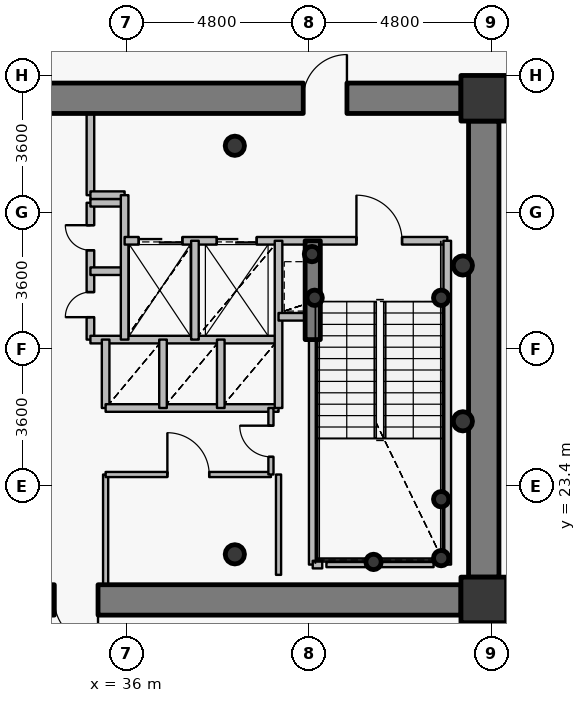
"""IFC4 building model, lengths in metres.
Left out: names, types, materials, properties, quantities, classifications, styles, units other than length and angle.
Written with IfcOpenShell. Run it as: python <this file> out.ifc"""

import sys

from ifc_helpers import new_model, si_unit, direction, frame, frame_2d, origin, origin_2d, place, context, subcontext, project, spatial, rectangle, hollow_circle, extrude, source, transform, mapped, element, fill, save


model = new_model("IFC4")
c1 = context("Model", 3, precision=1e-05, world=origin(), true_north=direction((0.0, 1.0)))
c2 = subcontext(c1, "Body", "Model", "MODEL_VIEW")
j1 = project(units=[si_unit("LENGTHUNIT", "METRE"), si_unit("PLANEANGLEUNIT", "RADIAN")], contexts=[c1])
p1 = place(None, origin())
s1 = spatial("IfcSite", under=j1, at=p1, CompositionType="ELEMENT")
p2 = place(p1, origin())
s2 = spatial("IfcBuilding", under=s1, at=p2, CompositionType="ELEMENT")
p3 = place(p2, frame((0.0, 0.0, 159.9)))
s3 = spatial("IfcBuildingStorey", under=s2, at=p3, CompositionType="ELEMENT", Elevation=159.9)
for number, where, z_axis, x_axis in (
    (1, (45.4, 20.4, 0.0), (0.0, 0.0, 1.0), (1.0, 0.0, 0.0)),
    (2, (45.4, 33.6, 0.0), (0.0, 0.0, 1.0), (1.0, 0.0, 0.0)),
):
    element("IfcColumn", number, at=place(p3, frame(where, z_axis=z_axis, x_axis=x_axis)), inside=s3, PredefinedType="COLUMN", context=c2, shape_type="SweptSolid", body=[
        extrude(rectangle(XDim=1.2, YDim=1.2, at=origin_2d()), origin(), (0.0, 0.0, 1.0), 3.75),
    ])
for number, where, z_axis, x_axis in (
    (3, (38.85, 21.6, 0.0), (0.0, 0.0, 1.0), (1.0, 0.0, 0.0)),
    (4, (38.85, 32.35, 0.0), (0.0, 0.0, 1.0), (1.0, 0.0, 0.0)),
):
    element("IfcColumn", number, at=place(p3, frame(where, z_axis=z_axis, x_axis=x_axis)), inside=s3, PredefinedType="COLUMN", context=c2, shape_type="SweptSolid", body=[
        extrude(hollow_circle(Radius=0.254, WallThickness=0.02, at=origin_2d()), origin(), (0.0, 0.0, 1.0), 3.75),
    ])
for number, where, z_axis, x_axis in (
    (5, (44.28, 21.5, 0.0), (0.0, 0.0, 1.0), (1.0, 0.0, 0.0)),
    (6, (44.28, 23.05, 0.0), (0.0, 0.0, 1.0), (1.0, 0.0, 0.0)),
    (7, (42.5, 21.4, 0.0), (0.0, 0.0, 1.0), (1.0, 0.0, 0.0)),
    (8, (40.95, 28.35, 0.0), (0.0, 0.0, 1.0), (1.0, 0.0, 0.0)),
    (9, (44.28, 28.35, 0.0), (0.0, 0.0, 1.0), (1.0, 0.0, 0.0)),
    (10, (40.88, 29.5, 0.0), (0.0, 0.0, 1.0), (1.0, 0.0, 0.0)),
):
    element("IfcColumn", number, at=place(p3, frame(where, z_axis=z_axis, x_axis=x_axis)), inside=s3, PredefinedType="COLUMN", context=c2, shape_type="SweptSolid", body=[
        extrude(hollow_circle(Radius=0.203, WallThickness=0.016, at=origin_2d()), origin(), (0.0, 0.0, 1.0), 3.75),
    ])
p4 = place(p3, frame((27.2, 33.6, 0.0), z_axis=(0.0, 0.0, 1.0), x_axis=(1.0, 0.0, 0.0)))
e11 = element("IfcWall", 11, at=p4, inside=s3, PredefinedType="SHEAR", context=c2, shape_type="SweptSolid", body=[
    extrude(rectangle(XDim=17.6, YDim=0.8, at=frame_2d((8.8, 0.0))), origin(), (0.0, 0.0, 1.0), 2.95),
])
p5 = place(p4, frame((13.45, 0.0, 0.0)))
e12 = element("IfcOpeningElement", 12, at=p5, cuts=e11, PredefinedType="OPENING", context=c2, shape_type="SweptSolid", body=[
    extrude(rectangle(XDim=1.15, YDim=2.15, at=origin_2d()), frame((0.575, 0.41, 1.075), z_axis=(0.0, -1.0, 0.0), x_axis=(1.0, 0.0, 0.0)), (0.0, 0.0, 1.0), 0.82),
])
p6 = place(p3, frame((45.4, 33.0, 0.0), z_axis=(0.0, 0.0, 1.0), x_axis=(0.0, -1.0, 0.0)))
e13 = element("IfcWall", 13, at=p6, inside=s3, PredefinedType="SHEAR", context=c2, shape_type="SweptSolid", body=[
    extrude(rectangle(XDim=12.0, YDim=0.8, at=frame_2d((6.0, 0.0))), origin(), (0.0, 0.0, 1.0), 2.95),
])
p7 = place(p3, frame((44.8, 20.4, 0.0), z_axis=(0.0, 0.0, 1.0), x_axis=(-1.0, 0.0, 0.0)))
e14 = element("IfcWall", 14, at=p7, inside=s3, PredefinedType="SHEAR", context=c2, shape_type="SweptSolid", body=[
    extrude(rectangle(XDim=17.6, YDim=0.8, at=frame_2d((8.8, 0.0))), origin(), (0.0, 0.0, 1.0), 2.95),
])
p8 = place(p7, frame((9.55, 0.0, 0.0)))
e15 = element("IfcOpeningElement", 15, at=p8, cuts=e14, PredefinedType="OPENING", context=c2, shape_type="SweptSolid", body=[
    extrude(rectangle(XDim=1.15, YDim=2.15, at=origin_2d()), frame((0.575, 0.41, 1.075), z_axis=(0.0, -1.0, 0.0), x_axis=(1.0, 0.0, 0.0)), (0.0, 0.0, 1.0), 0.82),
])
p9 = place(p3, frame((40.9, 27.25, 0.0), z_axis=(0.0, 0.0, 1.0), x_axis=(0.0, 1.0, 0.0)))
e16 = element("IfcWall", 16, at=p9, inside=s3, PredefinedType="SHEAR", context=c2, shape_type="SweptSolid", body=[
    extrude(rectangle(XDim=2.6, YDim=0.4, at=frame_2d((1.3, 0.0))), origin(), (0.0, 0.0, 1.0), 3.1),
])
for number, where, z_axis, x_axis in (
    (17, (44.85, 25.1, 0.0), (0.0, 0.0, 1.0), (1.0, 0.0, 0.0)),
    (18, (44.85, 29.2, 0.0), (0.0, 0.0, 1.0), (1.0, 0.0, 0.0)),
):
    element("IfcColumn", number, at=place(p3, frame(where, z_axis=z_axis, x_axis=x_axis)), inside=s3, PredefinedType="COLUMN", context=c2, shape_type="SweptSolid", body=[
        extrude(hollow_circle(Radius=0.254, WallThickness=0.02, at=origin_2d()), origin(), (0.0, 0.0, 1.0), 3.75),
    ])
p10 = place(p3, frame((35.05, 27.25, 0.0), z_axis=(0.0, 0.0, 1.0), x_axis=(0.0, 1.0, 0.0)))
e19 = element("IfcWall", 19, at=p10, inside=s3, PredefinedType="PARTITIONING", context=c2, shape_type="SweptSolid", body=[
    extrude(rectangle(XDim=3.6, YDim=0.2, at=frame_2d((1.8, 0.0))), origin(), (0.0, 0.0, 1.0), 3.5),
])
p11 = place(p10, frame((0.59, 0.0, 0.0)))
e20 = element("IfcOpeningElement", 20, at=p11, cuts=e19, PredefinedType="OPENING", context=c2, shape_type="SweptSolid", body=[
    extrude(rectangle(XDim=0.66, YDim=2.05, at=origin_2d()), frame((0.33, 0.11, 1.025), z_axis=(0.0, -1.0, 0.0), x_axis=(1.0, 0.0, 0.0)), (0.0, 0.0, 1.0), 0.22),
])
p12 = place(p10, frame((2.35, 0.0, 0.0)))
e21 = element("IfcOpeningElement", 21, at=p12, cuts=e19, PredefinedType="OPENING", context=c2, shape_type="SweptSolid", body=[
    extrude(rectangle(XDim=0.66, YDim=2.05, at=origin_2d()), frame((0.33, 0.11, 1.025), z_axis=(0.0, -1.0, 0.0), x_axis=(1.0, 0.0, 0.0)), (0.0, 0.0, 1.0), 0.22),
])
p13 = place(p3, frame((35.05, 27.25, 0.0), z_axis=(0.0, 0.0, 1.0), x_axis=(1.0, 0.0, 0.0)))
e22 = element("IfcWall", 22, at=p13, inside=s3, PredefinedType="PARTITIONING", context=c2, shape_type="SweptSolid", body=[
    extrude(rectangle(XDim=4.95, YDim=0.2, at=frame_2d((2.475, 0.0))), origin(), (0.0, 0.0, 1.0), 3.085),
])
for number, where, z_axis, x_axis in (
    (23, (35.05, 29.05, 0.0), (0.0, 0.0, 1.0), (1.0, 0.0, 0.0)),
    (24, (35.05, 30.85, 0.0), (0.0, 0.0, 1.0), (1.0, 0.0, 0.0)),
):
    element("IfcWall", number, at=place(p3, frame(where, z_axis=z_axis, x_axis=x_axis)), inside=s3, PredefinedType="PARTITIONING", context=c2, shape_type="SweptSolid", body=[
        extrude(rectangle(XDim=0.9, YDim=0.2, at=frame_2d((0.45, 0.0))), origin(), (0.0, 0.0, 1.0), 3.5),
    ])
p14 = place(p3, frame((35.05, 31.05, 0.0), z_axis=(0.0, 0.0, 1.0), x_axis=(0.0, 1.0, 0.0)))
e25 = element("IfcWall", 25, at=p14, inside=s3, PredefinedType="PARTITIONING", context=c2, shape_type="SweptSolid", body=[
    extrude(rectangle(XDim=2.15, YDim=0.2, at=frame_2d((1.075, 0.0))), origin(), (0.0, 0.0, 1.0), 3.085),
])
p15 = place(p3, frame((35.05, 31.05, 0.0), z_axis=(0.0, 0.0, 1.0), x_axis=(1.0, 0.0, 0.0)))
e26 = element("IfcWall", 26, at=p15, inside=s3, PredefinedType="PARTITIONING", context=c2, shape_type="SweptSolid", body=[
    extrude(rectangle(XDim=0.9, YDim=0.2, at=frame_2d((0.45, 0.0))), origin(), (0.0, 0.0, 1.0), 3.5),
])
p16 = place(p3, frame((35.45, 20.8, 0.0), z_axis=(0.0, 0.0, 1.0), x_axis=(0.0, 1.0, 0.0)))
e27 = element("IfcWall", 27, at=p16, inside=s3, PredefinedType="PARTITIONING", context=c2, shape_type="SweptSolid", body=[
    extrude(rectangle(XDim=2.9, YDim=0.135, at=frame_2d((1.45, 0.0))), origin(), (0.0, 0.0, 1.0), 3.085),
])
p17 = place(p3, frame((35.45, 23.7, 0.0), z_axis=(0.0, 0.0, 1.0), x_axis=(1.0, 0.0, 0.0)))
e28 = element("IfcWall", 28, at=p17, inside=s3, PredefinedType="PARTITIONING", context=c2, shape_type="SweptSolid", body=[
    extrude(rectangle(XDim=4.35, YDim=0.135, at=frame_2d((2.175, 0.0))), origin(), (0.0, 0.0, 1.0), 3.085),
])
p18 = place(p17, frame((1.625, 0.0, 0.0)))
e29 = element("IfcOpeningElement", 29, at=p18, cuts=e28, PredefinedType="OPENING", context=c2, shape_type="SweptSolid", body=[
    extrude(rectangle(XDim=1.1, YDim=2.15, at=origin_2d()), frame((0.55, 0.078, 1.075), z_axis=(0.0, -1.0, 0.0), x_axis=(1.0, 0.0, 0.0)), (0.0, 0.0, 1.0), 0.155),
])
p19 = place(p3, frame((35.45, 25.45, 0.0), z_axis=(0.0, 0.0, 1.0), x_axis=(0.0, 1.0, 0.0)))
e30 = element("IfcWall", 30, at=p19, inside=s3, PredefinedType="PARTITIONING", context=c2, shape_type="SweptSolid", body=[
    extrude(rectangle(XDim=1.8, YDim=0.2, at=frame_2d((0.9, 0.0))), origin(), (0.0, 0.0, 1.0), 3.5),
])
p20 = place(p3, frame((35.45, 25.45, 0.0), z_axis=(0.0, 0.0, 1.0), x_axis=(1.0, 0.0, 0.0)))
e31 = element("IfcWall", 31, at=p20, inside=s3, PredefinedType="PARTITIONING", context=c2, shape_type="SweptSolid", body=[
    extrude(rectangle(XDim=4.55, YDim=0.2, at=frame_2d((2.275, 0.0))), origin(), (0.0, 0.0, 1.0), 3.085),
])
p21 = place(p3, frame((35.95, 27.25, 0.0), z_axis=(0.0, 0.0, 1.0), x_axis=(0.0, 1.0, 0.0)))
e32 = element("IfcWall", 32, at=p21, inside=s3, PredefinedType="PARTITIONING", context=c2, shape_type="SweptSolid", body=[
    extrude(rectangle(XDim=3.8, YDim=0.2, at=frame_2d((1.9, 0.0))), origin(), (0.0, 0.0, 1.0), 3.5),
])
p22 = place(p3, frame((35.95, 29.85, 0.0), z_axis=(0.0, 0.0, 1.0), x_axis=(1.0, 0.0, 0.0)))
e33 = element("IfcWall", 33, at=p22, inside=s3, PredefinedType="PARTITIONING", context=c2, shape_type="SweptSolid", body=[
    extrude(rectangle(XDim=8.49, YDim=0.2, at=frame_2d((4.245, 0.0))), origin(), (0.0, 0.0, 1.0), 3.085),
])
p23 = place(p22, frame((6.1, 0.0, 0.0)))
e34 = element("IfcOpeningElement", 34, at=p23, cuts=e33, PredefinedType="OPENING", context=c2, shape_type="SweptSolid", body=[
    extrude(rectangle(XDim=1.2, YDim=2.15, at=origin_2d()), frame((0.6, 0.11, 1.075), z_axis=(0.0, -1.0, 0.0), x_axis=(1.0, 0.0, 0.0)), (0.0, 0.0, 1.0), 0.22),
])
p24 = place(p22, frame((0.37, 0.0, 0.0)))
e35 = element("IfcOpeningElement", 35, at=p24, cuts=e33, PredefinedType="OPENING", context=c2, shape_type="SweptSolid", body=[
    extrude(rectangle(XDim=1.15, YDim=2.15, at=origin_2d()), frame((0.575, 0.11, 1.075), z_axis=(0.0, -1.0, 0.0), x_axis=(1.0, 0.0, 0.0)), (0.0, 0.0, 1.0), 0.22),
])
p25 = place(p22, frame((2.425, 0.0, 0.0)))
e36 = element("IfcOpeningElement", 36, at=p25, cuts=e33, PredefinedType="OPENING", context=c2, shape_type="SweptSolid", body=[
    extrude(rectangle(XDim=1.05, YDim=2.15, at=origin_2d()), frame((0.525, 0.11, 1.075), z_axis=(0.0, -1.0, 0.0), x_axis=(1.0, 0.0, 0.0)), (0.0, 0.0, 1.0), 0.22),
])
p26 = place(p3, frame((36.96, 25.45, 0.0), z_axis=(0.0, 0.0, 1.0), x_axis=(0.0, 1.0, 0.0)))
e37 = element("IfcWall", 37, at=p26, inside=s3, PredefinedType="PARTITIONING", context=c2, shape_type="SweptSolid", body=[
    extrude(rectangle(XDim=1.8, YDim=0.2, at=frame_2d((0.9, 0.0))), origin(), (0.0, 0.0, 1.0), 3.5),
])
p27 = place(p3, frame((37.8, 27.25, 0.0), z_axis=(0.0, 0.0, 1.0), x_axis=(0.0, 1.0, 0.0)))
e38 = element("IfcWall", 38, at=p27, inside=s3, PredefinedType="PARTITIONING", context=c2, shape_type="SweptSolid", body=[
    extrude(rectangle(XDim=2.6, YDim=0.2, at=frame_2d((1.3, 0.0))), origin(), (0.0, 0.0, 1.0), 3.5),
])
p28 = place(p3, frame((38.48, 25.45, 0.0), z_axis=(0.0, 0.0, 1.0), x_axis=(0.0, 1.0, 0.0)))
e39 = element("IfcWall", 39, at=p28, inside=s3, PredefinedType="PARTITIONING", context=c2, shape_type="SweptSolid", body=[
    extrude(rectangle(XDim=1.8, YDim=0.2, at=frame_2d((0.9, 0.0))), origin(), (0.0, 0.0, 1.0), 3.5),
])
p29 = place(p3, frame((39.8, 23.7, 0.0), z_axis=(0.0, 0.0, 1.0), x_axis=(0.0, 1.0, 0.0)))
e40 = element("IfcWall", 40, at=p29, inside=s3, PredefinedType="PARTITIONING", context=c2, shape_type="SweptSolid", body=[
    extrude(rectangle(XDim=1.75, YDim=0.135, at=frame_2d((0.875, 0.0))), origin(), (0.0, 0.0, 1.0), 3.5),
])
p30 = place(p29, frame((0.465, 0.0, 0.0)))
e41 = element("IfcOpeningElement", 41, at=p30, cuts=e40, PredefinedType="OPENING", context=c2, shape_type="SweptSolid", body=[
    extrude(rectangle(XDim=0.82, YDim=2.1, at=origin_2d()), frame((0.41, 0.078, 1.05), z_axis=(0.0, -1.0, 0.0), x_axis=(1.0, 0.0, 0.0)), (0.0, 0.0, 1.0), 0.155),
])
p31 = place(p3, frame((40.0, 25.45, 0.0), z_axis=(0.0, 0.0, 1.0), x_axis=(0.0, 1.0, 0.0)))
e42 = element("IfcWall", 42, at=p31, inside=s3, PredefinedType="PARTITIONING", context=c2, shape_type="SweptSolid", body=[
    extrude(rectangle(XDim=4.4, YDim=0.2, at=frame_2d((2.2, 0.0))), origin(), (0.0, 0.0, 1.0), 3.5),
])
p32 = place(p3, frame((40.0, 27.85, 0.0), z_axis=(0.0, 0.0, 1.0), x_axis=(1.0, 0.0, 0.0)))
e43 = element("IfcWall", 43, at=p32, inside=s3, PredefinedType="PARTITIONING", context=c2, shape_type="SweptSolid", body=[
    extrude(rectangle(XDim=0.9, YDim=0.2, at=frame_2d((0.45, 0.0))), origin(), (0.0, 0.0, 1.0), 3.5),
])
p33 = place(p3, frame((40.9, 21.33, 0.0), z_axis=(0.0, 0.0, 1.0), x_axis=(0.0, 1.0, 0.0)))
e44 = element("IfcWall", 44, at=p33, inside=s3, PredefinedType="PARTITIONING", context=c2, shape_type="SweptSolid", body=[
    extrude(rectangle(XDim=5.91, YDim=0.2, at=frame_2d((2.955, 0.0))), origin(), (0.0, 0.0, 1.0), 3.035),
])
p34 = place(p3, frame((40.9, 21.33, 0.0), z_axis=(0.0, 0.0, 1.0), x_axis=(1.0, 0.0, 0.0)))
e45 = element("IfcWall", 45, at=p34, inside=s3, PredefinedType="PARTITIONING", context=c2, shape_type="SweptSolid", body=[
    extrude(rectangle(XDim=0.25, YDim=0.2, at=frame_2d((0.125, 0.0))), origin(), (0.0, 0.0, 1.0), 3.035),
])
p35 = place(p3, frame((44.44, 21.33, 0.0), z_axis=(0.0, 0.0, 1.0), x_axis=(0.0, 1.0, 0.0)))
e46 = element("IfcWall", 46, at=p35, inside=s3, PredefinedType="PARTITIONING", context=c2, shape_type="SweptSolid", body=[
    extrude(rectangle(XDim=8.52, YDim=0.2, at=frame_2d((4.26, 0.0))), origin(), (0.0, 0.0, 1.0), 3.5),
])
p36 = place(p3, frame((44.08, 21.33, 0.0), z_axis=(0.0, 0.0, 1.0), x_axis=(-1.0, 0.0, 0.0)))
e47 = element("IfcWall", 47, at=p36, inside=s3, PredefinedType="PARTITIONING", context=c2, shape_type="SweptSolid", body=[
    extrude(rectangle(XDim=2.82, YDim=0.135, at=frame_2d((1.41, 0.0))), origin(), (0.0, 0.0, 1.0), 3.035),
])
p37 = place(p3, frame((40.0, 23.7, 0.0), z_axis=(0.0, 0.0, 1.0), x_axis=(0.0, -1.0, 0.0)))
e48 = element("IfcWall", 48, at=p37, inside=s3, PredefinedType="PARTITIONING", context=c2, shape_type="SweptSolid", body=[
    extrude(rectangle(XDim=2.64, YDim=0.135, at=frame_2d((1.32, 0.0))), origin(), (0.0, 0.0, 1.0), 3.035),
])
for number, where, z_axis, x_axis in (
    (49, (45.8, 34.0, 0.0), (0.0, 0.0, 1.0), (-1.0, 0.0, 0.0)),
    (50, (44.81, 20.0, 0.0), (0.0, 0.0, 1.0), (1.0, 0.0, 0.0)),
):
    element("IfcWall", number, at=place(p3, frame(where, z_axis=z_axis, x_axis=x_axis)), inside=s3, PredefinedType="PARTITIONING", context=c2, shape_type="SweptSolid", body=[
        extrude(rectangle(XDim=0.99, YDim=0.135, at=frame_2d((0.495, 0.0))), origin(), (0.0, 0.0, 1.0), 2.935),
    ])
p38 = place(p3, frame((45.81, 20.05, 0.0), z_axis=(0.0, 0.0, 1.0), x_axis=(1.0, 0.0, 0.0)))
e51 = element("IfcWall", 51, at=p38, inside=s3, PredefinedType="PARTITIONING", context=c2, shape_type="SweptSolid", body=[
    extrude(rectangle(XDim=0.465, YDim=0.135, at=frame_2d((0.232, 0.0))), origin(), (0.0, 0.0, 1.0), 3.5),
])
p39 = place(p3, frame((45.8, 33.01, 0.0), z_axis=(0.0, 0.0, 1.0), x_axis=(0.0, 1.0, 0.0)))
e52 = element("IfcWall", 52, at=p39, inside=s3, PredefinedType="PARTITIONING", context=c2, shape_type="SweptSolid", body=[
    extrude(rectangle(XDim=0.682, YDim=0.15, at=frame_2d((0.341, 0.0))), origin(), (0.0, 0.0, 1.0), 3.5),
])
p40 = place(p3, frame((45.8, 33.767, 0.0), z_axis=(0.0, 0.0, 1.0), x_axis=(0.823065918238, 0.56794585502, 0.0)))
e53 = element("IfcWall", 53, at=p40, inside=s3, PredefinedType="PARTITIONING", context=c2, shape_type="SweptSolid", body=[
    extrude(rectangle(XDim=0.322, YDim=0.15, at=frame_2d((0.161, 0.0))), origin(), (0.0, 0.0, 1.0), 3.5),
])
p41 = place(p3, frame((45.8, 20.378, 0.0), z_axis=(0.0, 0.0, 1.0), x_axis=(0.0, 1.0, 0.0)))
e54 = element("IfcWall", 54, at=p41, inside=s3, PredefinedType="PARTITIONING", context=c2, shape_type="SweptSolid", body=[
    extrude(rectangle(XDim=0.612, YDim=0.135, at=frame_2d((0.306, 0.0))), origin(), (0.0, 0.0, 1.0), 3.5),
])
m1 = source(origin(), c2, "Body", "SweptSolid", [
    extrude(rectangle(XDim=1.15, YDim=2.15, at=origin_2d()), frame((0.575, 0.025, 1.075), z_axis=(0.0, -1.0, 0.0), x_axis=(1.0, 0.0, 0.0)), (0.0, 0.0, 1.0), 0.05),
])
p42 = place(p5, origin())
e55 = element("IfcDoor", 55, at=p42, inside=s3, OperationType="SINGLE_SWING_RIGHT", PredefinedType="DOOR", context=c2, shape_type="MappedRepresentation", body=[
    mapped(m1, transform((0.0, 0.0, 0.0), x_axis=(1.0, 0.0, 0.0), y_axis=(0.0, 1.0, 0.0), z_axis=(0.0, 0.0, 1.0), scale=1.0)),
])
fill(e12, e55)
p43 = place(p8, origin())
e56 = element("IfcDoor", 56, at=p43, inside=s3, OperationType="SINGLE_SWING_LEFT", PredefinedType="DOOR", context=c2, shape_type="MappedRepresentation", body=[
    mapped(m1, transform((0.0, 0.0, 0.0), x_axis=(1.0, 0.0, 0.0), y_axis=(0.0, 1.0, 0.0), z_axis=(0.0, 0.0, 1.0), scale=1.0)),
])
fill(e15, e56)
m2 = source(origin(), c2, "Body", "SweptSolid", [
    extrude(rectangle(XDim=1.2, YDim=2.15, at=origin_2d()), frame((0.6, 0.025, 1.075), z_axis=(0.0, -1.0, 0.0), x_axis=(1.0, 0.0, 0.0)), (0.0, 0.0, 1.0), 0.05),
])
p44 = place(p23, origin())
e57 = element("IfcDoor", 57, at=p44, inside=s3, OperationType="SINGLE_SWING_LEFT", PredefinedType="DOOR", context=c2, shape_type="MappedRepresentation", body=[
    mapped(m2, transform((0.0, 0.0, 0.0), x_axis=(1.0, 0.0, 0.0), y_axis=(0.0, 1.0, 0.0), z_axis=(0.0, 0.0, 1.0), scale=1.0)),
])
fill(e34, e57)
m3 = source(origin(), c2, "Body", "SweptSolid", [
    extrude(rectangle(XDim=1.15, YDim=2.15, at=origin_2d()), frame((0.575, 0.025, 1.075), z_axis=(0.0, -1.0, 0.0), x_axis=(1.0, 0.0, 0.0)), (0.0, 0.0, 1.0), 0.05),
])
p45 = place(p24, origin())
e58 = element("IfcDoor", 58, at=p45, inside=s3, OperationType="DOUBLE_DOOR_SLIDING", PredefinedType="USERDEFINED", context=c2, shape_type="MappedRepresentation", body=[
    mapped(m3, transform((0.0, 0.0, 0.0), x_axis=(1.0, 0.0, 0.0), y_axis=(0.0, 1.0, 0.0), z_axis=(0.0, 0.0, 1.0), scale=1.0)),
])
fill(e35, e58)
m4 = source(origin(), c2, "Body", "SweptSolid", [
    extrude(rectangle(XDim=1.05, YDim=2.15, at=origin_2d()), frame((0.525, 0.025, 1.075), z_axis=(0.0, -1.0, 0.0), x_axis=(1.0, 0.0, 0.0)), (0.0, 0.0, 1.0), 0.05),
])
p46 = place(p25, origin())
e59 = element("IfcDoor", 59, at=p46, inside=s3, OperationType="DOUBLE_DOOR_SLIDING", PredefinedType="USERDEFINED", context=c2, shape_type="MappedRepresentation", body=[
    mapped(m4, transform((0.0, 0.0, 0.0), x_axis=(1.0, 0.0, 0.0), y_axis=(0.0, 1.0, 0.0), z_axis=(0.0, 0.0, 1.0), scale=1.0)),
])
fill(e36, e59)
m5 = source(origin(), c2, "Body", "SweptSolid", [
    extrude(rectangle(XDim=0.66, YDim=2.05, at=origin_2d()), frame((0.33, 0.025, 1.025), z_axis=(0.0, -1.0, 0.0), x_axis=(1.0, 0.0, 0.0)), (0.0, 0.0, 1.0), 0.05),
])
p47 = place(p11, origin())
e60 = element("IfcDoor", 60, at=p47, inside=s3, OperationType="SINGLE_SWING_LEFT", PredefinedType="USERDEFINED", context=c2, shape_type="MappedRepresentation", body=[
    mapped(m5, transform((0.0, 0.0, 0.0), x_axis=(1.0, 0.0, 0.0), y_axis=(0.0, 1.0, 0.0), z_axis=(0.0, 0.0, 1.0), scale=1.0)),
])
fill(e20, e60)
p48 = place(p12, origin())
e61 = element("IfcDoor", 61, at=p48, inside=s3, OperationType="SINGLE_SWING_RIGHT", PredefinedType="USERDEFINED", context=c2, shape_type="MappedRepresentation", body=[
    mapped(m5, transform((0.0, 0.0, 0.0), x_axis=(1.0, 0.0, 0.0), y_axis=(0.0, 1.0, 0.0), z_axis=(0.0, 0.0, 1.0), scale=1.0)),
])
fill(e21, e61)
m6 = source(origin(), c2, "Body", "SweptSolid", [
    extrude(rectangle(XDim=1.1, YDim=2.15, at=origin_2d()), frame((0.55, 0.025, 1.075), z_axis=(0.0, -1.0, 0.0), x_axis=(1.0, 0.0, 0.0)), (0.0, 0.0, 1.0), 0.05),
])
p49 = place(p18, origin())
e62 = element("IfcDoor", 62, at=p49, inside=s3, OperationType="SINGLE_SWING_LEFT", PredefinedType="DOOR", context=c2, shape_type="MappedRepresentation", body=[
    mapped(m6, transform((0.0, 0.0, 0.0), x_axis=(1.0, 0.0, 0.0), y_axis=(0.0, 1.0, 0.0), z_axis=(0.0, 0.0, 1.0), scale=1.0)),
])
fill(e29, e62)
m7 = source(origin(), c2, "Body", "SweptSolid", [
    extrude(rectangle(XDim=0.82, YDim=2.1, at=origin_2d()), frame((0.41, 0.025, 1.05), z_axis=(0.0, -1.0, 0.0), x_axis=(1.0, 0.0, 0.0)), (0.0, 0.0, 1.0), 0.05),
])
p50 = place(p30, origin())
e63 = element("IfcDoor", 63, at=p50, inside=s3, OperationType="SINGLE_SWING_RIGHT", PredefinedType="DOOR", context=c2, shape_type="MappedRepresentation", body=[
    mapped(m7, transform((0.0, 0.0, 0.0), x_axis=(1.0, 0.0, 0.0), y_axis=(0.0, 1.0, 0.0), z_axis=(0.0, 0.0, 1.0), scale=1.0)),
])
fill(e41, e63)
save(model, sys.argv[1])
